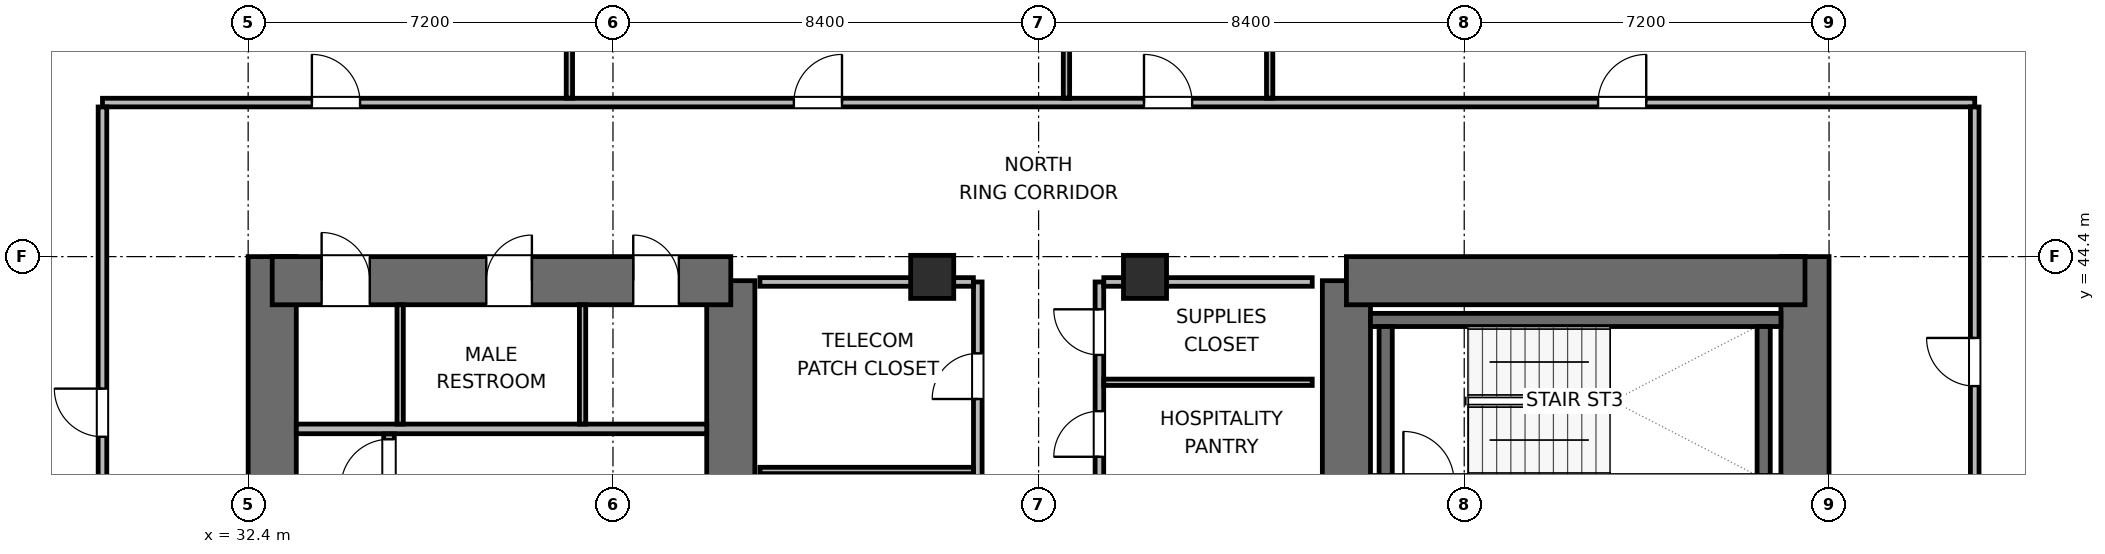
"""IFC4 building model, lengths in metres.
Left out: names, types, materials, properties, quantities, classifications, styles, units other than length and angle.
Written with IfcOpenShell. Run it as: python <this file> out.ifc"""

import sys

from ifc_helpers import new_model, si_unit, direction, frame, frame_2d, origin, origin_2d, place, context, subcontext, project, spatial, rectangle, extrude, element, fill, save


model = new_model("IFC4")
c1 = context("Model", 3, precision=1e-05, world=origin(), true_north=direction((0.0, 1.0)))
c2 = subcontext(c1, "Body", "Model", "MODEL_VIEW")
j1 = project(units=[si_unit("LENGTHUNIT", "METRE"), si_unit("PLANEANGLEUNIT", "RADIAN")], contexts=[c1])
p1 = place(None, origin())
s1 = spatial("IfcSite", under=j1, at=p1, CompositionType="ELEMENT")
p2 = place(p1, origin())
s2 = spatial("IfcBuilding", under=s1, at=p2, CompositionType="ELEMENT")
p3 = place(p2, frame((0.0, 0.0, 56.7)))
s3 = spatial("IfcBuildingStorey", under=s2, at=p3, CompositionType="ELEMENT", Elevation=56.7)
p4 = place(p3, frame((32.875, 27.6, 0.0), z_axis=(0.0, 0.0, 1.0), x_axis=(0.0, 1.0, 0.0)))
e1 = element("IfcWall", 1, at=p4, inside=s3, PredefinedType="SHEAR", context=c2, shape_type="SweptSolid", body=[
    extrude(rectangle(XDim=16.8, YDim=0.95, at=frame_2d((8.4, 0.0))), origin(), (0.0, 0.0, 1.0), 3.9),
])
p5 = place(p3, frame((41.925, 37.8, 0.0), z_axis=(0.0, 0.0, 1.0), x_axis=(0.0, 1.0, 0.0)))
e2 = element("IfcWall", 2, at=p5, inside=s3, PredefinedType="SHEAR", context=c2, shape_type="SweptSolid", body=[
    extrude(rectangle(XDim=6.125, YDim=0.95, at=frame_2d((3.062, 0.0))), origin(), (0.0, 0.0, 1.0), 3.9),
])
p6 = place(p3, frame((32.875, 43.925, 0.0), z_axis=(0.0, 0.0, 1.0), x_axis=(1.0, 0.0, 0.0)))
e3 = element("IfcWall", 3, at=p6, inside=s3, PredefinedType="SHEAR", context=c2, shape_type="SweptSolid", body=[
    extrude(rectangle(XDim=9.05, YDim=0.95, at=frame_2d((4.525, 0.0))), origin(), (0.0, 0.0, 1.0), 3.9),
])
p7 = place(p6, frame((0.975, 0.0, 0.0)))
e4 = element("IfcOpeningElement", 4, at=p7, cuts=e3, PredefinedType="OPENING", context=c2, shape_type="SweptSolid", body=[
    extrude(rectangle(XDim=0.95, YDim=2.04, at=frame_2d((0.475, 1.02))), frame((0.0, 0.485, 0.0), z_axis=(0.0, -1.0, 0.0), x_axis=(1.0, 0.0, 0.0)), (0.0, 0.0, 1.0), 0.97),
])
p8 = place(p6, frame((4.225, 0.0, 0.0)))
e5 = element("IfcOpeningElement", 5, at=p8, cuts=e3, PredefinedType="OPENING", context=c2, shape_type="SweptSolid", body=[
    extrude(rectangle(XDim=0.9, YDim=2.02, at=frame_2d((0.45, 1.01))), frame((0.0, 0.485, 0.0), z_axis=(0.0, -1.0, 0.0), x_axis=(1.0, 0.0, 0.0)), (0.0, 0.0, 1.0), 0.97),
])
p9 = place(p6, frame((7.125, 0.0, 0.0)))
e6 = element("IfcOpeningElement", 6, at=p9, cuts=e3, PredefinedType="OPENING", context=c2, shape_type="SweptSolid", body=[
    extrude(rectangle(XDim=0.9, YDim=2.02, at=frame_2d((0.45, 1.01))), frame((0.0, 0.485, 0.0), z_axis=(0.0, -1.0, 0.0), x_axis=(1.0, 0.0, 0.0)), (0.0, 0.0, 1.0), 0.97),
])
p10 = place(p3, frame((54.075, 38.0, 0.0), z_axis=(0.0, 0.0, 1.0), x_axis=(0.0, 1.0, 0.0)))
e7 = element("IfcWall", 7, at=p10, inside=s3, PredefinedType="SHEAR", context=c2, shape_type="SweptSolid", body=[
    extrude(rectangle(XDim=5.925, YDim=0.95, at=frame_2d((2.962, 0.0))), origin(), (0.0, 0.0, 1.0), 3.9),
])
p11 = place(p3, frame((63.125, 27.6, 0.0), z_axis=(0.0, 0.0, 1.0), x_axis=(0.0, 1.0, 0.0)))
e8 = element("IfcWall", 8, at=p11, inside=s3, PredefinedType="SHEAR", context=c2, shape_type="SweptSolid", body=[
    extrude(rectangle(XDim=16.8, YDim=0.95, at=frame_2d((8.4, 0.0))), origin(), (0.0, 0.0, 1.0), 3.9),
])
p12 = place(p3, frame((54.075, 43.925, 0.0), z_axis=(0.0, 0.0, 1.0), x_axis=(1.0, 0.0, 0.0)))
e9 = element("IfcWall", 9, at=p12, inside=s3, PredefinedType="SHEAR", context=c2, shape_type="SweptSolid", body=[
    extrude(rectangle(XDim=9.05, YDim=0.95, at=frame_2d((4.525, 0.0))), origin(), (0.0, 0.0, 1.0), 3.9),
])
p13 = place(p3, frame((54.55, 43.15, 0.0), z_axis=(0.0, 0.0, 1.0), x_axis=(1.0, 0.0, 0.0)))
e10 = element("IfcWall", 10, at=p13, inside=s3, PredefinedType="SHEAR", context=c2, shape_type="SweptSolid", body=[
    extrude(rectangle(XDim=8.1, YDim=0.26, at=frame_2d((4.05, 0.0))), origin(), (0.0, 0.0, 1.0), 3.9),
])
for number, where, z_axis, x_axis in (
    (11, (54.85, 40.08, 0.0), (0.0, 0.0, 1.0), (0.0, 1.0, 0.0)),
    (12, (62.31, 40.08, 0.0), (0.0, 0.0, 1.0), (0.0, 1.0, 0.0)),
):
    element("IfcWall", number, at=place(p3, frame(where, z_axis=z_axis, x_axis=x_axis)), inside=s3, PredefinedType="SHEAR", context=c2, shape_type="SweptSolid", body=[
        extrude(rectangle(XDim=2.94, YDim=0.26, at=frame_2d((1.47, 0.0))), origin(), (0.0, 0.0, 1.0), 3.9),
    ])
for number, where, z_axis, x_axis in (
    (13, (45.9, 44.0, 0.0), (0.0, 0.0, 1.0), (1.0, 0.0, 0.0)),
    (14, (50.1, 44.0, 0.0), (0.0, 0.0, 1.0), (1.0, 0.0, 0.0)),
):
    element("IfcColumn", number, at=place(p3, frame(where, z_axis=z_axis, x_axis=x_axis)), inside=s3, PredefinedType="COLUMN", context=c2, shape_type="SweptSolid", body=[
        extrude(rectangle(XDim=0.85, YDim=0.85, at=origin_2d()), origin(), (0.0, 0.0, 1.0), 3.9),
    ])
p14 = place(p3, frame((33.35, 41.0, 0.0), z_axis=(0.0, 0.0, 1.0), x_axis=(1.0, 0.0, 0.0)))
e15 = element("IfcWall", 15, at=p14, inside=s3, PredefinedType="PLUMBINGWALL", context=c2, shape_type="SweptSolid", body=[
    extrude(rectangle(XDim=8.1, YDim=0.19, at=frame_2d((4.05, 0.0))), origin(), (0.0, 0.0, 1.0), 3.64),
])
for number, where, z_axis, x_axis in (
    (16, (35.4, 41.095, 0.0), (0.0, 0.0, 1.0), (0.0, 1.0, 0.0)),
    (17, (39.0, 41.095, 0.0), (0.0, 0.0, 1.0), (0.0, 1.0, 0.0)),
):
    element("IfcWall", number, at=place(p3, frame(where, z_axis=z_axis, x_axis=x_axis)), inside=s3, PredefinedType="PARTITIONING", context=c2, shape_type="SweptSolid", body=[
        extrude(rectangle(XDim=2.355, YDim=0.125, at=frame_2d((1.177, 0.0))), origin(), (0.0, 0.0, 1.0), 3.64),
    ])
p15 = place(p3, frame((35.18, 39.74, 0.0), z_axis=(0.0, 0.0, 1.0), x_axis=(0.0, 1.0, 0.0)))
e18 = element("IfcWall", 18, at=p15, inside=s3, PredefinedType="PARTITIONING", context=c2, shape_type="SweptSolid", body=[
    extrude(rectangle(XDim=1.16, YDim=0.21, at=frame_2d((0.58, 0.0))), origin(), (0.0, 0.0, 1.0), 3.64),
])
p16 = place(p15, frame((0.105, 0.0, 0.0)))
e19 = element("IfcOpeningElement", 19, at=p16, cuts=e18, PredefinedType="OPENING", context=c2, shape_type="SweptSolid", body=[
    extrude(rectangle(XDim=0.95, YDim=2.04, at=frame_2d((0.475, 1.02))), frame((0.0, 0.115, 0.0), z_axis=(0.0, -1.0, 0.0), x_axis=(1.0, 0.0, 0.0)), (0.0, 0.0, 1.0), 0.23),
])
p17 = place(p3, frame((46.8, 37.9, 0.0), z_axis=(0.0, 0.0, 1.0), x_axis=(0.0, 1.0, 0.0)))
e20 = element("IfcWall", 20, at=p17, inside=s3, PredefinedType="PARTITIONING", context=c2, shape_type="SweptSolid", body=[
    extrude(rectangle(XDim=6.0, YDim=0.17, at=frame_2d((3.0, 0.0))), origin(), (0.0, 0.0, 1.0), 3.64),
])
p18 = place(p17, frame((0.69, 0.0, 0.0)))
e21 = element("IfcOpeningElement", 21, at=p18, cuts=e20, PredefinedType="OPENING", context=c2, shape_type="SweptSolid", body=[
    extrude(rectangle(XDim=0.9, YDim=2.02, at=frame_2d((0.45, 1.01))), frame((0.0, 0.095, 0.0), z_axis=(0.0, -1.0, 0.0), x_axis=(1.0, 0.0, 0.0)), (0.0, 0.0, 1.0), 0.19),
])
p19 = place(p17, frame((3.69, 0.0, 0.0)))
e22 = element("IfcOpeningElement", 22, at=p19, cuts=e20, PredefinedType="OPENING", context=c2, shape_type="SweptSolid", body=[
    extrude(rectangle(XDim=0.9, YDim=2.02, at=frame_2d((0.45, 1.01))), frame((0.0, 0.095, 0.0), z_axis=(0.0, -1.0, 0.0), x_axis=(1.0, 0.0, 0.0)), (0.0, 0.0, 1.0), 0.19),
])
p20 = place(p3, frame((42.5, 43.9, 0.0), z_axis=(0.0, 0.0, 1.0), x_axis=(1.0, 0.0, 0.0)))
e23 = element("IfcWall", 23, at=p20, inside=s3, PredefinedType="PARTITIONING", context=c2, shape_type="SweptSolid", body=[
    extrude(rectangle(XDim=4.213, YDim=0.17, at=frame_2d((2.106, 0.0))), origin(), (0.0, 0.0, 1.0), 2.525),
])
p21 = place(p3, frame((42.5, 40.18, 0.0), z_axis=(0.0, 0.0, 1.0), x_axis=(1.0, 0.0, 0.0)))
e24 = element("IfcWall", 24, at=p21, inside=s3, PredefinedType="PARTITIONING", context=c2, shape_type="SweptSolid", body=[
    extrude(rectangle(XDim=4.213, YDim=0.125, at=frame_2d((2.106, 0.0))), origin(), (0.0, 0.0, 1.0), 3.64),
])
p22 = place(p3, frame((49.2, 37.9, 0.0), z_axis=(0.0, 0.0, 1.0), x_axis=(0.0, 1.0, 0.0)))
e25 = element("IfcWall", 25, at=p22, inside=s3, PredefinedType="PARTITIONING", context=c2, shape_type="SweptSolid", body=[
    extrude(rectangle(XDim=6.0, YDim=0.17, at=frame_2d((3.0, 0.0))), origin(), (0.0, 0.0, 1.0), 3.64),
])
p23 = place(p22, frame((0.54, 0.0, 0.0)))
e26 = element("IfcOpeningElement", 26, at=p23, cuts=e25, PredefinedType="OPENING", context=c2, shape_type="SweptSolid", body=[
    extrude(rectangle(XDim=0.9, YDim=2.02, at=frame_2d((0.45, 1.01))), frame((0.0, 0.095, 0.0), z_axis=(0.0, -1.0, 0.0), x_axis=(1.0, 0.0, 0.0)), (0.0, 0.0, 1.0), 0.19),
])
p24 = place(p22, frame((2.55, 0.0, 0.0)))
e27 = element("IfcOpeningElement", 27, at=p24, cuts=e25, PredefinedType="OPENING", context=c2, shape_type="SweptSolid", body=[
    extrude(rectangle(XDim=0.9, YDim=2.02, at=frame_2d((0.45, 1.01))), frame((0.0, 0.095, 0.0), z_axis=(0.0, -1.0, 0.0), x_axis=(1.0, 0.0, 0.0)), (0.0, 0.0, 1.0), 0.19),
])
p25 = place(p22, frame((4.56, 0.0, 0.0)))
e28 = element("IfcOpeningElement", 28, at=p25, cuts=e25, PredefinedType="OPENING", context=c2, shape_type="SweptSolid", body=[
    extrude(rectangle(XDim=0.9, YDim=2.02, at=frame_2d((0.45, 1.01))), frame((0.0, 0.095, 0.0), z_axis=(0.0, -1.0, 0.0), x_axis=(1.0, 0.0, 0.0)), (0.0, 0.0, 1.0), 0.19),
])
p26 = place(p3, frame((49.287, 43.9, 0.0), z_axis=(0.0, 0.0, 1.0), x_axis=(1.0, 0.0, 0.0)))
e29 = element("IfcWall", 29, at=p26, inside=s3, PredefinedType="PARTITIONING", context=c2, shape_type="SweptSolid", body=[
    extrude(rectangle(XDim=4.113, YDim=0.17, at=frame_2d((2.056, 0.0))), origin(), (0.0, 0.0, 1.0), 2.525),
])
p27 = place(p3, frame((49.287, 41.92, 0.0), z_axis=(0.0, 0.0, 1.0), x_axis=(1.0, 0.0, 0.0)))
e30 = element("IfcWall", 30, at=p27, inside=s3, PredefinedType="PARTITIONING", context=c2, shape_type="SweptSolid", body=[
    extrude(rectangle(XDim=4.113, YDim=0.125, at=frame_2d((2.056, 0.0))), origin(), (0.0, 0.0, 1.0), 3.64),
])
p28 = place(p3, frame((29.525, 47.44, 0.0), z_axis=(0.0, 0.0, 1.0), x_axis=(1.0, 0.0, 0.0)))
e31 = element("IfcWall", 31, at=p28, inside=s3, PredefinedType="PARTITIONING", context=c2, shape_type="SweptSolid", body=[
    extrude(rectangle(XDim=36.95, YDim=0.17, at=frame_2d((18.475, 0.0))), origin(), (0.0, 0.0, 1.0), 3.64),
])
p29 = place(p28, frame((4.133, 0.0, 0.0)))
e32 = element("IfcOpeningElement", 32, at=p29, cuts=e31, PredefinedType="OPENING", context=c2, shape_type="SweptSolid", body=[
    extrude(rectangle(XDim=0.95, YDim=2.04, at=frame_2d((0.475, 1.02))), frame((0.0, 0.095, 0.0), z_axis=(0.0, -1.0, 0.0), x_axis=(1.0, 0.0, 0.0)), (0.0, 0.0, 1.0), 0.19),
])
p30 = place(p28, frame((13.645, 0.0, 0.0)))
e33 = element("IfcOpeningElement", 33, at=p30, cuts=e31, PredefinedType="OPENING", context=c2, shape_type="SweptSolid", body=[
    extrude(rectangle(XDim=0.95, YDim=2.04, at=frame_2d((0.475, 1.02))), frame((0.0, 0.095, 0.0), z_axis=(0.0, -1.0, 0.0), x_axis=(1.0, 0.0, 0.0)), (0.0, 0.0, 1.0), 0.19),
])
p31 = place(p28, frame((20.555, 0.0, 0.0)))
e34 = element("IfcOpeningElement", 34, at=p31, cuts=e31, PredefinedType="OPENING", context=c2, shape_type="SweptSolid", body=[
    extrude(rectangle(XDim=0.95, YDim=2.04, at=frame_2d((0.475, 1.02))), frame((0.0, 0.095, 0.0), z_axis=(0.0, -1.0, 0.0), x_axis=(1.0, 0.0, 0.0)), (0.0, 0.0, 1.0), 0.19),
])
p32 = place(p28, frame((29.517, 0.0, 0.0)))
e35 = element("IfcOpeningElement", 35, at=p32, cuts=e31, PredefinedType="OPENING", context=c2, shape_type="SweptSolid", body=[
    extrude(rectangle(XDim=0.95, YDim=2.04, at=frame_2d((0.475, 1.02))), frame((0.0, 0.095, 0.0), z_axis=(0.0, -1.0, 0.0), x_axis=(1.0, 0.0, 0.0)), (0.0, 0.0, 1.0), 0.19),
])
p33 = place(p3, frame((29.525, 24.647, 0.0), z_axis=(0.0, 0.0, 1.0), x_axis=(0.0, 1.0, 0.0)))
e36 = element("IfcWall", 36, at=p33, inside=s3, PredefinedType="PARTITIONING", context=c2, shape_type="SweptSolid", body=[
    extrude(rectangle(XDim=22.706, YDim=0.17, at=frame_2d((11.353, 0.0))), origin(), (0.0, 0.0, 1.0), 3.64),
])
p34 = place(p33, frame((4.758, 0.0, 0.0)))
e37 = element("IfcOpeningElement", 37, at=p34, cuts=e36, PredefinedType="OPENING", context=c2, shape_type="SweptSolid", body=[
    extrude(rectangle(XDim=0.95, YDim=2.04, at=frame_2d((0.475, 1.02))), frame((0.0, 0.095, 0.0), z_axis=(0.0, -1.0, 0.0), x_axis=(1.0, 0.0, 0.0)), (0.0, 0.0, 1.0), 0.19),
])
p35 = place(p33, frame((16.198, 0.0, 0.0)))
e38 = element("IfcOpeningElement", 38, at=p35, cuts=e36, PredefinedType="OPENING", context=c2, shape_type="SweptSolid", body=[
    extrude(rectangle(XDim=0.95, YDim=2.04, at=frame_2d((0.475, 1.02))), frame((0.0, 0.095, 0.0), z_axis=(0.0, -1.0, 0.0), x_axis=(1.0, 0.0, 0.0)), (0.0, 0.0, 1.0), 0.19),
])
p36 = place(p3, frame((66.475, 24.647, 0.0), z_axis=(0.0, 0.0, 1.0), x_axis=(0.0, 1.0, 0.0)))
e39 = element("IfcWall", 39, at=p36, inside=s3, PredefinedType="PARTITIONING", context=c2, shape_type="SweptSolid", body=[
    extrude(rectangle(XDim=22.706, YDim=0.17, at=frame_2d((11.353, 0.0))), origin(), (0.0, 0.0, 1.0), 3.64),
])
p37 = place(p36, frame((5.758, 0.0, 0.0)))
e40 = element("IfcOpeningElement", 40, at=p37, cuts=e39, PredefinedType="OPENING", context=c2, shape_type="SweptSolid", body=[
    extrude(rectangle(XDim=0.95, YDim=2.04, at=frame_2d((0.475, 1.02))), frame((0.0, 0.095, 0.0), z_axis=(0.0, -1.0, 0.0), x_axis=(1.0, 0.0, 0.0)), (0.0, 0.0, 1.0), 0.19),
])
p38 = place(p36, frame((17.198, 0.0, 0.0)))
e41 = element("IfcOpeningElement", 41, at=p38, cuts=e39, PredefinedType="OPENING", context=c2, shape_type="SweptSolid", body=[
    extrude(rectangle(XDim=0.95, YDim=2.04, at=frame_2d((0.475, 1.02))), frame((0.0, 0.095, 0.0), z_axis=(0.0, -1.0, 0.0), x_axis=(1.0, 0.0, 0.0)), (0.0, 0.0, 1.0), 0.19),
])
p39 = place(p3, frame((38.74, 47.527, 0.0), z_axis=(0.0, 0.0, 1.0), x_axis=(0.0, 1.0, 0.0)))
e42 = element("IfcWall", 42, at=p39, inside=s3, PredefinedType="PARTITIONING", context=c2, shape_type="SweptSolid", body=[
    extrude(rectangle(XDim=14.628, YDim=0.125, at=frame_2d((7.314, 0.0))), origin(), (0.0, 0.0, 1.0), 3.64),
])
p40 = place(p3, frame((48.55, 47.527, 0.0), z_axis=(0.0, 0.0, 1.0), x_axis=(0.0, 1.0, 0.0)))
e43 = element("IfcWall", 43, at=p40, inside=s3, PredefinedType="PARTITIONING", context=c2, shape_type="SweptSolid", body=[
    extrude(rectangle(XDim=11.013, YDim=0.125, at=frame_2d((5.506, 0.0))), origin(), (0.0, 0.0, 1.0), 3.64),
])
p41 = place(p3, frame((52.56, 47.527, 0.0), z_axis=(0.0, 0.0, 1.0), x_axis=(0.0, 1.0, 0.0)))
e44 = element("IfcWall", 44, at=p41, inside=s3, PredefinedType="PARTITIONING", context=c2, shape_type="SweptSolid", body=[
    extrude(rectangle(XDim=10.898, YDim=0.125, at=frame_2d((5.449, 0.0))), origin(), (0.0, 0.0, 1.0), 3.003),
])
p42 = place(p7, origin())
e45 = element("IfcDoor", 45, at=p42, inside=s3, OperationType="SINGLE_SWING_LEFT", PredefinedType="DOOR", context=c2, shape_type="SweptSolid", body=[
    extrude(rectangle(XDim=0.95, YDim=2.04, at=frame_2d((0.475, 1.02))), frame((0.0, 0.025, 0.0), z_axis=(0.0, -1.0, 0.0), x_axis=(1.0, 0.0, 0.0)), (0.0, 0.0, 1.0), 0.05),
])
fill(e4, e45)
p43 = place(p8, origin())
e46 = element("IfcDoor", 46, at=p43, inside=s3, OperationType="SINGLE_SWING_RIGHT", PredefinedType="DOOR", context=c2, shape_type="SweptSolid", body=[
    extrude(rectangle(XDim=0.9, YDim=2.02, at=frame_2d((0.45, 1.01))), frame((0.0, 0.025, 0.0), z_axis=(0.0, -1.0, 0.0), x_axis=(1.0, 0.0, 0.0)), (0.0, 0.0, 1.0), 0.05),
])
fill(e5, e46)
p44 = place(p9, origin())
e47 = element("IfcDoor", 47, at=p44, inside=s3, OperationType="SINGLE_SWING_LEFT", PredefinedType="DOOR", context=c2, shape_type="SweptSolid", body=[
    extrude(rectangle(XDim=0.9, YDim=2.02, at=frame_2d((0.45, 1.01))), frame((0.0, 0.025, 0.0), z_axis=(0.0, -1.0, 0.0), x_axis=(1.0, 0.0, 0.0)), (0.0, 0.0, 1.0), 0.05),
])
fill(e6, e47)
p45 = place(p16, origin())
e48 = element("IfcDoor", 48, at=p45, inside=s3, OperationType="SINGLE_SWING_LEFT", PredefinedType="DOOR", context=c2, shape_type="SweptSolid", body=[
    extrude(rectangle(XDim=0.95, YDim=2.04, at=frame_2d((0.475, 1.02))), frame((0.0, 0.025, 0.0), z_axis=(0.0, -1.0, 0.0), x_axis=(1.0, 0.0, 0.0)), (0.0, 0.0, 1.0), 0.05),
])
fill(e19, e48)
p46 = place(p19, origin())
e49 = element("IfcDoor", 49, at=p46, inside=s3, OperationType="SINGLE_SWING_LEFT", PredefinedType="DOOR", context=c2, shape_type="SweptSolid", body=[
    extrude(rectangle(XDim=0.9, YDim=2.02, at=frame_2d((0.45, 1.01))), frame((0.0, 0.025, 0.0), z_axis=(0.0, -1.0, 0.0), x_axis=(1.0, 0.0, 0.0)), (0.0, 0.0, 1.0), 0.05),
])
fill(e22, e49)
p47 = place(p24, origin())
e50 = element("IfcDoor", 50, at=p47, inside=s3, OperationType="SINGLE_SWING_LEFT", PredefinedType="DOOR", context=c2, shape_type="SweptSolid", body=[
    extrude(rectangle(XDim=0.9, YDim=2.02, at=frame_2d((0.45, 1.01))), frame((0.0, 0.025, 0.0), z_axis=(0.0, -1.0, 0.0), x_axis=(1.0, 0.0, 0.0)), (0.0, 0.0, 1.0), 0.05),
])
fill(e27, e50)
p48 = place(p25, origin())
e51 = element("IfcDoor", 51, at=p48, inside=s3, OperationType="SINGLE_SWING_RIGHT", PredefinedType="DOOR", context=c2, shape_type="SweptSolid", body=[
    extrude(rectangle(XDim=0.9, YDim=2.02, at=frame_2d((0.45, 1.01))), frame((0.0, 0.025, 0.0), z_axis=(0.0, -1.0, 0.0), x_axis=(1.0, 0.0, 0.0)), (0.0, 0.0, 1.0), 0.05),
])
fill(e28, e51)
p49 = place(p29, origin())
e52 = element("IfcDoor", 52, at=p49, inside=s3, OperationType="SINGLE_SWING_LEFT", PredefinedType="DOOR", context=c2, shape_type="SweptSolid", body=[
    extrude(rectangle(XDim=0.95, YDim=2.04, at=frame_2d((0.475, 1.02))), frame((0.0, 0.025, 0.0), z_axis=(0.0, -1.0, 0.0), x_axis=(1.0, 0.0, 0.0)), (0.0, 0.0, 1.0), 0.05),
])
fill(e32, e52)
p50 = place(p30, origin())
e53 = element("IfcDoor", 53, at=p50, inside=s3, OperationType="SINGLE_SWING_RIGHT", PredefinedType="DOOR", context=c2, shape_type="SweptSolid", body=[
    extrude(rectangle(XDim=0.95, YDim=2.04, at=frame_2d((0.475, 1.02))), frame((0.0, 0.025, 0.0), z_axis=(0.0, -1.0, 0.0), x_axis=(1.0, 0.0, 0.0)), (0.0, 0.0, 1.0), 0.05),
])
fill(e33, e53)
p51 = place(p31, origin())
e54 = element("IfcDoor", 54, at=p51, inside=s3, OperationType="SINGLE_SWING_LEFT", PredefinedType="DOOR", context=c2, shape_type="SweptSolid", body=[
    extrude(rectangle(XDim=0.95, YDim=2.04, at=frame_2d((0.475, 1.02))), frame((0.0, 0.025, 0.0), z_axis=(0.0, -1.0, 0.0), x_axis=(1.0, 0.0, 0.0)), (0.0, 0.0, 1.0), 0.05),
])
fill(e34, e54)
p52 = place(p32, origin())
e55 = element("IfcDoor", 55, at=p52, inside=s3, OperationType="SINGLE_SWING_RIGHT", PredefinedType="DOOR", context=c2, shape_type="SweptSolid", body=[
    extrude(rectangle(XDim=0.95, YDim=2.04, at=frame_2d((0.475, 1.02))), frame((0.0, 0.025, 0.0), z_axis=(0.0, -1.0, 0.0), x_axis=(1.0, 0.0, 0.0)), (0.0, 0.0, 1.0), 0.05),
])
fill(e35, e55)
p53 = place(p35, origin())
e56 = element("IfcDoor", 56, at=p53, inside=s3, OperationType="SINGLE_SWING_RIGHT", PredefinedType="DOOR", context=c2, shape_type="SweptSolid", body=[
    extrude(rectangle(XDim=0.95, YDim=2.04, at=frame_2d((0.475, 1.02))), frame((0.0, 0.025, 0.0), z_axis=(0.0, -1.0, 0.0), x_axis=(1.0, 0.0, 0.0)), (0.0, 0.0, 1.0), 0.05),
])
fill(e38, e56)
p54 = place(p38, origin())
e57 = element("IfcDoor", 57, at=p54, inside=s3, OperationType="SINGLE_SWING_RIGHT", PredefinedType="DOOR", context=c2, shape_type="SweptSolid", body=[
    extrude(rectangle(XDim=0.95, YDim=2.04, at=frame_2d((0.475, 1.02))), frame((0.0, 0.025, 0.0), z_axis=(0.0, -1.0, 0.0), x_axis=(1.0, 0.0, 0.0)), (0.0, 0.0, 1.0), 0.05),
])
fill(e41, e57)
save(model, sys.argv[1])
